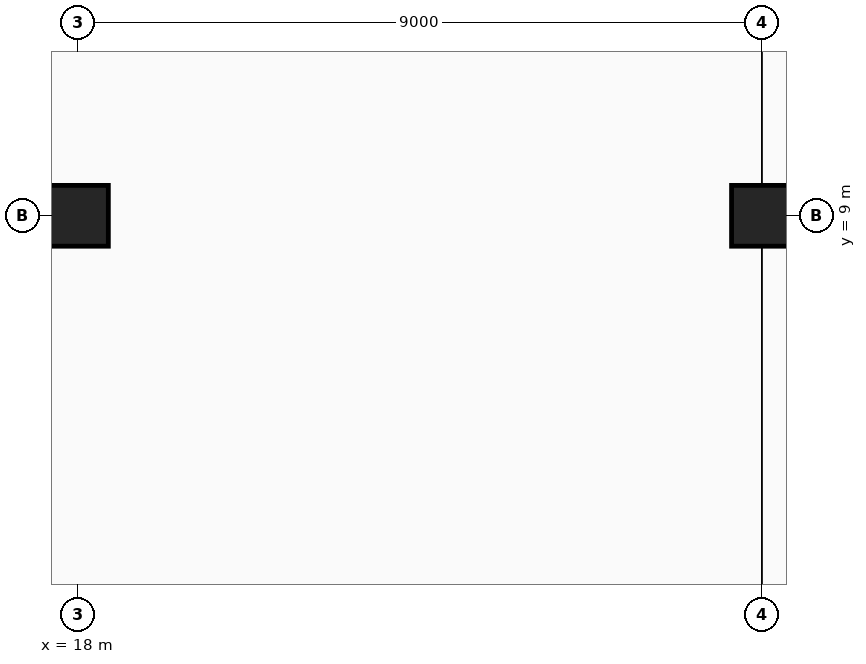
"""IFC4 building model, lengths in metres.
Left out: names, types, materials, properties, quantities, classifications, styles, units other than length and angle.
Written with IfcOpenShell. Run it as: python <this file> out.ifc"""

import sys

from ifc_helpers import new_model, si_unit, direction, frame, origin, origin_2d, place, context, subcontext, project, spatial, rectangle, extrude, element, save


model = new_model("IFC4")
c1 = context("Model", 3, precision=1e-05, world=origin(), true_north=direction((0.0, 1.0)))
c2 = subcontext(c1, "Body", "Model", "MODEL_VIEW")
j1 = project(units=[si_unit("LENGTHUNIT", "METRE"), si_unit("PLANEANGLEUNIT", "RADIAN")], contexts=[c1])
p1 = place(None, origin())
s1 = spatial("IfcSite", under=j1, at=p1, CompositionType="ELEMENT")
p2 = place(p1, origin())
s2 = spatial("IfcBuilding", under=s1, at=p2, CompositionType="ELEMENT")
p3 = place(p2, frame((0.0, 0.0, -5.1)))
s3 = spatial("IfcBuildingStorey", under=s2, at=p3, CompositionType="ELEMENT", Elevation=-5.1)
for number, where, z_axis, x_axis in (
    (1, (18.0, 9.0, 0.0), (0.0, 0.0, 1.0), (1.0, 0.0, 0.0)),
    (2, (27.0, 9.0, 0.0), (0.0, 0.0, 1.0), (1.0, 0.0, 0.0)),
):
    element("IfcColumn", number, at=place(p3, frame(where, z_axis=z_axis, x_axis=x_axis)), inside=s3, PredefinedType="COLUMN", context=c2, shape_type="SweptSolid", body=[
        extrude(rectangle(XDim=0.8, YDim=0.8, at=origin_2d()), origin(), (0.0, 0.0, 1.0), 5.1),
    ])
save(model, sys.argv[1])
